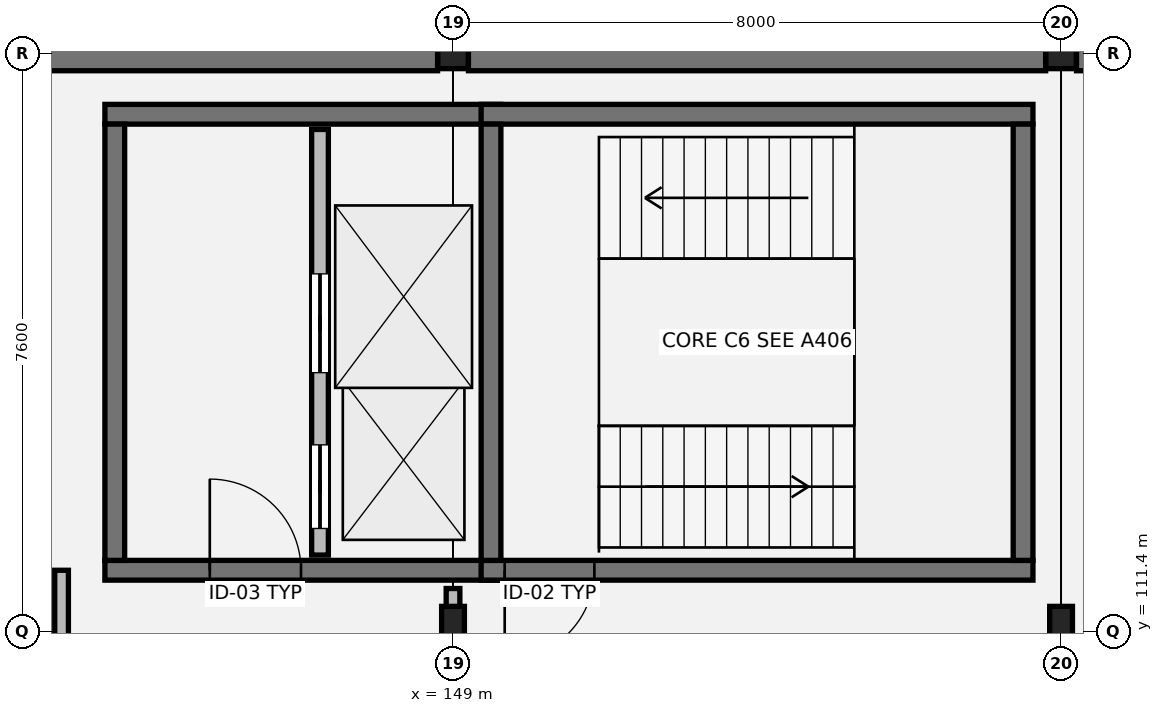
"""IFC4 building model, lengths in metres.
Left out: names, types, materials, properties, quantities, classifications, styles, units other than length and angle.
Written with IfcOpenShell. Run it as: python <this file> out.ifc"""

import sys

from ifc_helpers import new_model, si_unit, direction, frame, frame_2d, origin, origin_2d, place, context, subcontext, project, spatial, rectangle, hollow_rectangle, i_section, extrude, element, fill, save


model = new_model("IFC4")
c1 = context("Model", 3, precision=1e-05, world=origin(), true_north=direction((0.0, 1.0)))
c2 = subcontext(c1, "Body", "Model", "MODEL_VIEW")
j1 = project(units=[si_unit("LENGTHUNIT", "METRE"), si_unit("PLANEANGLEUNIT", "RADIAN")], contexts=[c1])
p1 = place(None, origin())
s1 = spatial("IfcSite", under=j1, at=p1, CompositionType="ELEMENT")
p2 = place(p1, origin())
s2 = spatial("IfcBuilding", under=s1, at=p2, CompositionType="ELEMENT")
p3 = place(p2, frame((0.0, 0.0, -4.42)))
s3 = spatial("IfcBuildingStorey", under=s2, at=p3, CompositionType="ELEMENT", Elevation=-4.42)
p4 = place(p3, frame((149.0, 111.4, 0.0), z_axis=(0.0, 0.0, 1.0), x_axis=(1.0, 0.0, 0.0)))
e1 = element("IfcColumn", 1, at=p4, inside=s3, PredefinedType="COLUMN", context=c2, shape_type="SweptSolid", body=[
    extrude(i_section(OverallWidth=0.3, OverallDepth=0.65, WebThickness=0.016, FlangeThickness=0.031, at=origin_2d()), origin(), (0.0, 0.0, 1.0), 4.395),
])
p5 = place(p3, frame((149.0, 119.0, 0.0), z_axis=(0.0, 0.0, 1.0), x_axis=(1.0, 0.0, 0.0)))
e2 = element("IfcColumn", 2, at=p5, inside=s3, PredefinedType="COLUMN", context=c2, shape_type="SweptSolid", body=[
    extrude(hollow_rectangle(XDim=0.4, YDim=0.4, WallThickness=0.016, at=origin_2d()), origin(), (0.0, 0.0, 1.0), 4.395),
])
p6 = place(p3, frame((157.0, 111.4, 0.0), z_axis=(0.0, 0.0, 1.0), x_axis=(1.0, 0.0, 0.0)))
e3 = element("IfcColumn", 3, at=p6, inside=s3, PredefinedType="COLUMN", context=c2, shape_type="SweptSolid", body=[
    extrude(i_section(OverallWidth=0.3, OverallDepth=0.65, WebThickness=0.016, FlangeThickness=0.031, at=origin_2d()), origin(), (0.0, 0.0, 1.0), 4.395),
])
p7 = place(p3, frame((157.0, 119.0, 0.0), z_axis=(0.0, 0.0, 1.0), x_axis=(1.0, 0.0, 0.0)))
e4 = element("IfcColumn", 4, at=p7, inside=s3, PredefinedType="COLUMN", context=c2, shape_type="SweptSolid", body=[
    extrude(hollow_rectangle(XDim=0.4, YDim=0.4, WallThickness=0.016, at=origin_2d()), origin(), (0.0, 0.0, 1.0), 4.395),
])
for number, where, z_axis, x_axis in (
    (5, (141.203, 119.0, 0.0), (0.0, 0.0, 1.0), (1.0, 0.0, 0.0)),
    (6, (149.203, 119.0, 0.0), (0.0, 0.0, 1.0), (1.0, 0.0, 0.0)),
    (7, (157.203, 119.0, 0.0), (0.0, 0.0, 1.0), (1.0, 0.0, 0.0)),
):
    element("IfcWall", number, at=place(p3, frame(where, z_axis=z_axis, x_axis=x_axis)), inside=s3, PredefinedType="USERDEFINED", context=c2, shape_type="SweptSolid", body=[
        extrude(rectangle(XDim=7.594, YDim=0.455, at=frame_2d((3.797, 0.0))), origin(), (0.0, 0.0, 1.0), 3.82),
    ])
p8 = place(p3, frame((144.42, 112.2, 0.0), z_axis=(0.0, 0.0, 1.0), x_axis=(1.0, 0.0, 0.0)))
e8 = element("IfcWall", 8, at=p8, inside=s3, PredefinedType="SHEAR", context=c2, shape_type="SweptSolid", body=[
    extrude(rectangle(XDim=5.21, YDim=0.26, at=frame_2d((2.605, 0.0))), origin(), (0.0, 0.0, 1.0), 4.185),
])
p9 = place(p8, frame((1.38, 0.0, 0.0)))
e9 = element("IfcOpeningElement", 9, at=p9, cuts=e8, PredefinedType="OPENING", context=c2, shape_type="SweptSolid", body=[
    extrude(rectangle(XDim=1.2, YDim=2.16, at=frame_2d((0.6, 1.08))), frame((0.0, 0.14, 0.0), z_axis=(0.0, -1.0, 0.0), x_axis=(1.0, 0.0, 0.0)), (0.0, 0.0, 1.0), 0.28),
])
p10 = place(p3, frame((149.63, 118.2, 0.0), z_axis=(0.0, 0.0, 1.0), x_axis=(-1.0, 0.0, 0.0)))
e10 = element("IfcWall", 10, at=p10, inside=s3, PredefinedType="SHEAR", context=c2, shape_type="SweptSolid", body=[
    extrude(rectangle(XDim=5.21, YDim=0.26, at=frame_2d((2.605, 0.0))), origin(), (0.0, 0.0, 1.0), 4.185),
])
p11 = place(p3, frame((144.55, 118.07, 0.0), z_axis=(0.0, 0.0, 1.0), x_axis=(0.0, -1.0, 0.0)))
e11 = element("IfcWall", 11, at=p11, inside=s3, PredefinedType="SHEAR", context=c2, shape_type="SweptSolid", body=[
    extrude(rectangle(XDim=5.74, YDim=0.26, at=frame_2d((2.87, 0.0))), origin(), (0.0, 0.0, 1.0), 4.185),
])
p12 = place(p3, frame((147.25, 112.4, 0.0), z_axis=(0.0, 0.0, 1.0), x_axis=(0.0, 1.0, 0.0)))
e12 = element("IfcWall", 12, at=p12, inside=s3, PredefinedType="SOLIDWALL", context=c2, shape_type="SweptSolid", body=[
    extrude(rectangle(XDim=5.6, YDim=0.22, at=frame_2d((2.8, 0.0))), origin(), (0.0, 0.0, 1.0), 4.185),
])
p13 = place(p12, frame((0.35, 0.0, 0.0)))
e13 = element("IfcOpeningElement", 13, at=p13, cuts=e12, PredefinedType="OPENING", context=c2, shape_type="SweptSolid", body=[
    extrude(rectangle(XDim=1.1, YDim=2.15, at=frame_2d((0.55, 1.075))), frame((0.0, 0.12, 0.0), z_axis=(0.0, -1.0, 0.0), x_axis=(1.0, 0.0, 0.0)), (0.0, 0.0, 1.0), 0.24),
])
p14 = place(p12, frame((2.4, 0.0, 0.0)))
e14 = element("IfcOpeningElement", 14, at=p14, cuts=e12, PredefinedType="OPENING", context=c2, shape_type="SweptSolid", body=[
    extrude(rectangle(XDim=1.3, YDim=2.18, at=frame_2d((0.65, 1.09))), frame((0.0, 0.12, 0.0), z_axis=(0.0, -1.0, 0.0), x_axis=(1.0, 0.0, 0.0)), (0.0, 0.0, 1.0), 0.24),
])
p15 = place(p3, frame((149.37, 112.2, 0.0), z_axis=(0.0, 0.0, 1.0), x_axis=(1.0, 0.0, 0.0)))
e15 = element("IfcWall", 15, at=p15, inside=s3, PredefinedType="SHEAR", context=c2, shape_type="SweptSolid", body=[
    extrude(rectangle(XDim=7.26, YDim=0.26, at=frame_2d((3.63, 0.0))), origin(), (0.0, 0.0, 1.0), 4.185),
])
p16 = place(p15, frame((0.31, 0.0, 0.0)))
e16 = element("IfcOpeningElement", 16, at=p16, cuts=e15, PredefinedType="OPENING", context=c2, shape_type="SweptSolid", body=[
    extrude(rectangle(XDim=1.18, YDim=2.18, at=frame_2d((0.59, 1.09))), frame((0.0, 0.14, 0.0), z_axis=(0.0, -1.0, 0.0), x_axis=(1.0, 0.0, 0.0)), (0.0, 0.0, 1.0), 0.28),
])
p17 = place(p3, frame((149.37, 118.2, 0.0), z_axis=(0.0, 0.0, 1.0), x_axis=(1.0, 0.0, 0.0)))
e17 = element("IfcWall", 17, at=p17, inside=s3, PredefinedType="SHEAR", context=c2, shape_type="SweptSolid", body=[
    extrude(rectangle(XDim=7.26, YDim=0.26, at=frame_2d((3.63, 0.0))), origin(), (0.0, 0.0, 1.0), 4.185),
])
for number, where, z_axis, x_axis in (
    (18, (149.5, 112.33, 0.0), (0.0, 0.0, 1.0), (0.0, 1.0, 0.0)),
    (19, (156.5, 112.33, 0.0), (0.0, 0.0, 1.0), (0.0, 1.0, 0.0)),
):
    element("IfcWall", number, at=place(p3, frame(where, z_axis=z_axis, x_axis=x_axis)), inside=s3, PredefinedType="SHEAR", context=c2, shape_type="SweptSolid", body=[
        extrude(rectangle(XDim=5.74, YDim=0.26, at=frame_2d((2.87, 0.0))), origin(), (0.0, 0.0, 1.0), 4.185),
    ])
p18 = place(p3, frame((149.0, 111.64, 0.0), z_axis=(0.0, 0.0, 1.0), x_axis=(0.0, 1.0, 0.0)))
e20 = element("IfcWall", 20, at=p18, inside=s3, PredefinedType="PARTITIONING", context=c2, shape_type="SweptSolid", body=[
    extrude(rectangle(XDim=0.32, YDim=0.18, at=frame_2d((0.16, 0.0))), origin(), (0.0, 0.0, 1.0), 3.52),
])
p19 = place(p3, frame((143.85, 110.76, 0.0), z_axis=(0.0, 0.0, 1.0), x_axis=(0.0, 1.0, 0.0)))
e21 = element("IfcWall", 21, at=p19, inside=s3, PredefinedType="PARTITIONING", context=c2, shape_type="SweptSolid", body=[
    extrude(rectangle(XDim=1.44, YDim=0.18, at=frame_2d((0.72, 0.0))), origin(), (0.0, 0.0, 1.0), 3.52),
])
p20 = place(p9, origin())
e22 = element("IfcDoor", 22, at=p20, inside=s3, OperationType="SINGLE_SWING_LEFT", PredefinedType="DOOR", context=c2, shape_type="SweptSolid", body=[
    extrude(rectangle(XDim=1.2, YDim=2.16, at=frame_2d((0.6, 1.08))), frame((0.0, 0.025, 0.0), z_axis=(0.0, -1.0, 0.0), x_axis=(1.0, 0.0, 0.0)), (0.0, 0.0, 1.0), 0.05),
])
fill(e9, e22)
p21 = place(p13, origin())
e23 = element("IfcDoor", 23, at=p21, inside=s3, OperationType="SLIDING_TO_LEFT", PredefinedType="DOOR", context=c2, shape_type="SweptSolid", body=[
    extrude(rectangle(XDim=1.1, YDim=2.15, at=frame_2d((0.55, 1.075))), frame((0.0, 0.025, 0.0), z_axis=(0.0, -1.0, 0.0), x_axis=(1.0, 0.0, 0.0)), (0.0, 0.0, 1.0), 0.05),
])
fill(e13, e23)
p22 = place(p14, origin())
e24 = element("IfcDoor", 24, at=p22, inside=s3, OperationType="SLIDING_TO_LEFT", PredefinedType="DOOR", context=c2, shape_type="SweptSolid", body=[
    extrude(rectangle(XDim=1.3, YDim=2.18, at=frame_2d((0.65, 1.09))), frame((0.0, 0.025, 0.0), z_axis=(0.0, -1.0, 0.0), x_axis=(1.0, 0.0, 0.0)), (0.0, 0.0, 1.0), 0.05),
])
fill(e14, e24)
p23 = place(p16, origin())
e25 = element("IfcDoor", 25, at=p23, inside=s3, OperationType="SINGLE_SWING_RIGHT", PredefinedType="DOOR", context=c2, shape_type="SweptSolid", body=[
    extrude(rectangle(XDim=1.18, YDim=2.18, at=frame_2d((0.59, 1.09))), frame((0.0, 0.025, 0.0), z_axis=(0.0, -1.0, 0.0), x_axis=(1.0, 0.0, 0.0)), (0.0, 0.0, 1.0), 0.05),
])
fill(e16, e25)
save(model, sys.argv[1])
